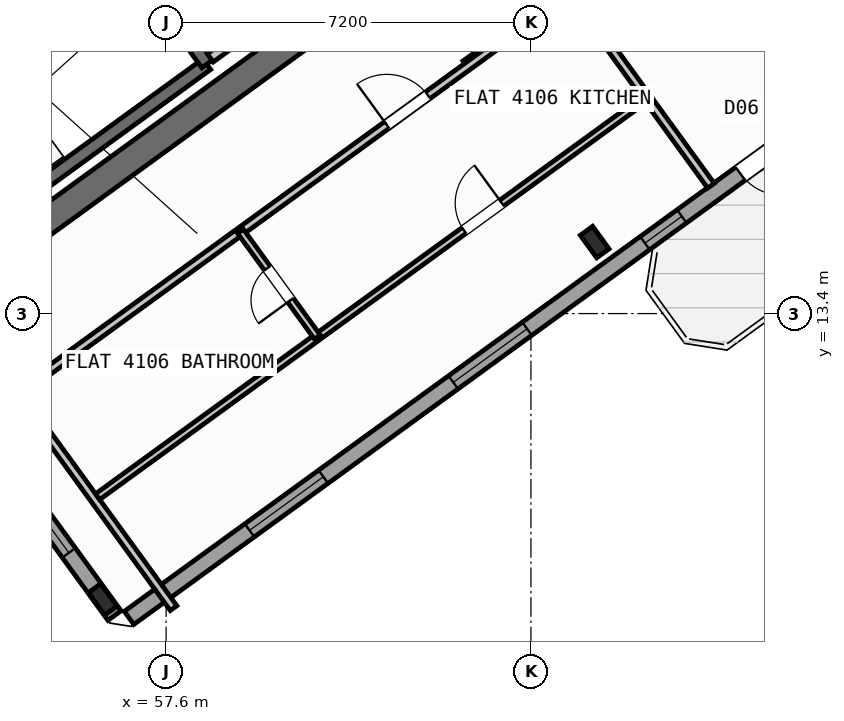
"""IFC4 building model, lengths in metres.
Left out: names, types, materials, properties, quantities, classifications, styles, units other than length and angle.
Written with IfcOpenShell. Run it as: python <this file> out.ifc"""

import sys

from ifc_helpers import new_model, si_unit, direction, frame, frame_2d, origin, origin_2d, place, context, subcontext, project, spatial, rectangle, i_section, extrude, source, transform, mapped, element, fill, save


model = new_model("IFC4")
c1 = context("Model", 3, precision=1e-05, world=origin(), true_north=direction((0.0, 1.0)))
c2 = subcontext(c1, "Body", "Model", "MODEL_VIEW")
j1 = project(units=[si_unit("LENGTHUNIT", "METRE"), si_unit("PLANEANGLEUNIT", "RADIAN")], contexts=[c1])
p1 = place(None, origin())
s1 = spatial("IfcSite", under=j1, at=p1, CompositionType="ELEMENT")
p2 = place(p1, origin())
s2 = spatial("IfcBuilding", under=s1, at=p2, CompositionType="ELEMENT")
p3 = place(p2, frame((0.0, 0.0, 162.3)))
s3 = spatial("IfcBuildingStorey", under=s2, at=p3, CompositionType="ELEMENT", Elevation=162.3)
p4 = place(p3, frame((52.359, 13.14, 0.0), z_axis=(0.0, 0.0, 1.0), x_axis=(0.809014896919, 0.587788139183, 0.0)))
e1 = element("IfcWall", 1, at=p4, inside=s3, PredefinedType="SHEAR", context=c2, shape_type="SweptSolid", body=[
    extrude(rectangle(XDim=12.34, YDim=0.55, at=frame_2d((6.17, 0.0))), origin(), (0.0, 0.0, 1.0), 3.35),
])
m1 = source(origin(), c2, "Body", "SweptSolid", [
    extrude(i_section(OverallWidth=0.3, OverallDepth=0.55, WebThickness=0.015, FlangeThickness=0.029, at=origin_2d()), origin(), (0.0, 0.0, 1.0), 3.6),
])
for number, where, z_axis, x_axis in (
    (2, (56.35, 7.758, 0.0), (0.0, 0.0, 1.0), (0.809, 0.588, 0.0)),
    (3, (66.058, 14.811, 0.0), (0.0, 0.0, 1.0), (0.809, 0.588, 0.0)),
):
    element("IfcColumn", number, at=place(p3, frame(where, z_axis=z_axis, x_axis=x_axis)), inside=s3, PredefinedType="COLUMN", context=c2, shape_type="MappedRepresentation", body=[
        mapped(m1, transform((0.0, 0.0, 0.0), scale=1.0)),
    ])
p5 = place(p3, frame((58.455, 35.484, 0.0), z_axis=(0.0, 0.0, 1.0), x_axis=(0.587783625747, -0.809018176127, 0.0)))
e4 = element("IfcWall", 4, at=p5, inside=s3, PredefinedType="STANDARD", context=c2, shape_type="SweptSolid", body=[
    extrude(rectangle(XDim=21.587, YDim=0.32, at=frame_2d((10.794, 0.0))), origin(), (0.0, 0.0, 1.0), 2.775),
])
p6 = place(p5, frame((1.475, 0.0, 0.8)))
e5 = element("IfcOpeningElement", 5, at=p6, cuts=e4, PredefinedType="OPENING", context=c2, shape_type="SweptSolid", body=[
    extrude(rectangle(XDim=2.1, YDim=1.55, at=frame_2d((1.05, 0.775))), frame((0.0, 0.17, 0.0), z_axis=(0.0, -1.0, 0.0), x_axis=(1.0, 0.0, 0.0)), (0.0, 0.0, 1.0), 0.34),
])
p7 = place(p5, frame((5.13, 0.0, 0.85)))
e6 = element("IfcOpeningElement", 6, at=p7, cuts=e4, PredefinedType="OPENING", context=c2, shape_type="SweptSolid", body=[
    extrude(rectangle(XDim=1.5, YDim=1.5, at=frame_2d((0.75, 0.75))), frame((0.0, 0.17, 0.0), z_axis=(0.0, -1.0, 0.0), x_axis=(1.0, 0.0, 0.0)), (0.0, 0.0, 1.0), 0.34),
])
p8 = place(p5, frame((8.929, 0.0, 0.85)))
e7 = element("IfcOpeningElement", 7, at=p8, cuts=e4, PredefinedType="OPENING", context=c2, shape_type="SweptSolid", body=[
    extrude(rectangle(XDim=1.5, YDim=1.5, at=frame_2d((0.75, 0.75))), frame((0.0, 0.17, 0.0), z_axis=(0.0, -1.0, 0.0), x_axis=(1.0, 0.0, 0.0)), (0.0, 0.0, 1.0), 0.34),
])
p9 = place(p5, frame((17.581, 0.0, 0.95)))
e8 = element("IfcOpeningElement", 8, at=p9, cuts=e4, PredefinedType="OPENING", context=c2, shape_type="SweptSolid", body=[
    extrude(rectangle(XDim=1.2, YDim=1.4, at=frame_2d((0.6, 0.7))), frame((0.0, 0.17, 0.0), z_axis=(0.0, -1.0, 0.0), x_axis=(1.0, 0.0, 0.0)), (0.0, 0.0, 1.0), 0.34),
])
p10 = place(p3, frame((71.098, 17.731, 0.0), z_axis=(0.0, 0.0, 1.0), x_axis=(-0.809021120468, -0.587779573171, 0.0)))
e9 = element("IfcWall", 9, at=p10, inside=s3, PredefinedType="STANDARD", context=c2, shape_type="SweptSolid", body=[
    extrude(rectangle(XDim=17.588, YDim=0.32, at=frame_2d((8.794, 0.0))), origin(), (0.0, 0.0, 1.0), 3.35),
])
p11 = place(p10, frame((1.624, 0.0, 0.0)))
e10 = element("IfcOpeningElement", 10, at=p11, cuts=e9, PredefinedType="OPENING", context=c2, shape_type="SweptSolid", body=[
    extrude(rectangle(XDim=1.05, YDim=2.15, at=frame_2d((0.525, 1.075))), frame((0.0, 0.17, 0.0), z_axis=(0.0, -1.0, 0.0), x_axis=(1.0, 0.0, 0.0)), (0.0, 0.0, 1.0), 0.34),
])
p12 = place(p10, frame((4.104, 0.0, 1.0)))
e11 = element("IfcOpeningElement", 11, at=p12, cuts=e9, PredefinedType="OPENING", context=c2, shape_type="SweptSolid", body=[
    extrude(rectangle(XDim=0.9, YDim=1.25, at=frame_2d((0.45, 0.625))), frame((0.0, 0.17, 0.0), z_axis=(0.0, -1.0, 0.0), x_axis=(1.0, 0.0, 0.0)), (0.0, 0.0, 1.0), 0.34),
])
p13 = place(p10, frame((7.879, 0.0, 0.85)))
e12 = element("IfcOpeningElement", 12, at=p13, cuts=e9, PredefinedType="OPENING", context=c2, shape_type="SweptSolid", body=[
    extrude(rectangle(XDim=1.8, YDim=1.5, at=frame_2d((0.9, 0.75))), frame((0.0, 0.17, 0.0), z_axis=(0.0, -1.0, 0.0), x_axis=(1.0, 0.0, 0.0)), (0.0, 0.0, 1.0), 0.34),
])
p14 = place(p10, frame((12.849, 0.0, 0.85)))
e13 = element("IfcOpeningElement", 13, at=p14, cuts=e9, PredefinedType="OPENING", context=c2, shape_type="SweptSolid", body=[
    extrude(rectangle(XDim=1.8, YDim=1.5, at=frame_2d((0.9, 0.75))), frame((0.0, 0.17, 0.0), z_axis=(0.0, -1.0, 0.0), x_axis=(1.0, 0.0, 0.0)), (0.0, 0.0, 1.0), 0.34),
])
p15 = place(p3, frame((56.581, 7.439, 0.0), z_axis=(0.0, 0.0, 1.0), x_axis=(-0.587771678454, 0.809026856172, 0.0)))
e14 = element("IfcWall", 14, at=p15, inside=s3, PredefinedType="STANDARD", context=c2, shape_type="SweptSolid", body=[
    extrude(rectangle(XDim=6.824, YDim=0.32, at=frame_2d((3.412, 0.0))), origin(), (0.0, 0.0, 1.0), 2.775),
])
p16 = place(p15, frame((1.531, 0.0, 0.8)))
e15 = element("IfcOpeningElement", 15, at=p16, cuts=e14, PredefinedType="OPENING", context=c2, shape_type="SweptSolid", body=[
    extrude(rectangle(XDim=2.1, YDim=1.55, at=frame_2d((1.05, 0.775))), frame((0.0, 0.17, 0.0), z_axis=(0.0, -1.0, 0.0), x_axis=(1.0, 0.0, 0.0)), (0.0, 0.0, 1.0), 0.34),
])
p17 = place(p3, frame((52.472, 14.013, 0.0), z_axis=(0.0, 0.0, 1.0), x_axis=(0.809028366311, 0.587769599847, 0.0)))
e16 = element("IfcWall", 16, at=p17, inside=s3, PredefinedType="SHEAR", context=c2, shape_type="SweptSolid", body=[
    extrude(rectangle(XDim=7.33, YDim=0.26, at=frame_2d((3.665, 0.0))), origin(), (0.0, 0.0, 1.0), 3.35),
])
p18 = place(p3, frame((50.615, 16.57, 0.0), z_axis=(0.0, 0.0, 1.0), x_axis=(0.809028366311, 0.587769599847, 0.0)))
e17 = element("IfcWall", 17, at=p18, inside=s3, PredefinedType="SHEAR", context=c2, shape_type="SweptSolid", body=[
    extrude(rectangle(XDim=7.33, YDim=0.26, at=frame_2d((3.665, 0.0))), origin(), (0.0, 0.0, 1.0), 3.35),
])
p19 = place(p18, frame((0.22, 0.0, 0.0)))
e18 = element("IfcOpeningElement", 18, at=p19, cuts=e17, PredefinedType="OPENING", context=c2, shape_type="SweptSolid", body=[
    extrude(rectangle(XDim=1.1, YDim=2.1, at=frame_2d((0.55, 1.05))), frame((0.0, 0.14, 0.0), z_axis=(0.0, -1.0, 0.0), x_axis=(1.0, 0.0, 0.0)), (0.0, 0.0, 1.0), 0.28),
])
p20 = place(p3, frame((58.41, 18.327, 0.0), z_axis=(0.0, 0.0, 1.0), x_axis=(-0.58776738483, 0.809029975545, 0.0)))
e19 = element("IfcWall", 19, at=p20, inside=s3, PredefinedType="SHEAR", context=c2, shape_type="SweptSolid", body=[
    extrude(rectangle(XDim=3.16, YDim=0.26, at=frame_2d((1.58, 0.0))), origin(), (0.0, 0.0, 1.0), 3.35),
])
p21 = place(p3, frame((58.472, 18.447, 0.0), z_axis=(0.0, 0.0, 1.0), x_axis=(0.809018631237, 0.587782999339, 0.0)))
e20 = element("IfcWall", 20, at=p21, inside=s3, PredefinedType="STANDARD", context=c2, shape_type="SweptSolid", body=[
    extrude(rectangle(XDim=3.698, YDim=0.2, at=frame_2d((1.849, 0.0))), origin(), (0.0, 0.0, 1.0), 3.34),
])
p22 = place(p3, frame((63.507, 18.322, 0.0), z_axis=(0.0, 0.0, 1.0), x_axis=(0.809034604122, 0.587761013791, 0.0)))
e21 = element("IfcWall", 21, at=p22, inside=s3, PredefinedType="PARTITIONING", context=c2, shape_type="SweptSolid", body=[
    extrude(rectangle(XDim=2.51, YDim=0.16, at=frame_2d((1.255, 0.0))), origin(), (0.0, 0.0, 1.0), 3.34),
])
p23 = place(p3, frame((68.353, 15.922, 0.0), z_axis=(0.0, 0.0, 1.0), x_axis=(-0.58776839458, 0.809029241952, 0.0)))
e22 = element("IfcWall", 22, at=p23, inside=s3, PredefinedType="PARTITIONING", context=c2, shape_type="SweptSolid", body=[
    extrude(rectangle(XDim=8.1, YDim=0.16, at=frame_2d((4.05, 0.0))), origin(), (0.0, 0.0, 1.0), 3.34),
])
p24 = place(p3, frame((53.705, 11.126, 0.0), z_axis=(0.0, 0.0, 1.0), x_axis=(0.809014504436, 0.587788679384, 0.0)))
e23 = element("IfcWall", 23, at=p24, inside=s3, PredefinedType="PARTITIONING", context=c2, shape_type="SweptSolid", body=[
    extrude(rectangle(XDim=14.67, YDim=0.16, at=frame_2d((7.335, 0.0))), origin(), (0.0, 0.0, 1.0), 3.34),
])
p25 = place(p24, frame((10.2, 0.0, 0.0)))
e24 = element("IfcOpeningElement", 24, at=p25, cuts=e23, PredefinedType="OPENING", context=c2, shape_type="SweptSolid", body=[
    extrude(rectangle(XDim=1.0, YDim=2.1, at=frame_2d((0.5, 1.05))), frame((0.0, 0.09, 0.0), z_axis=(0.0, -1.0, 0.0), x_axis=(1.0, 0.0, 0.0)), (0.0, 0.0, 1.0), 0.18),
])
p26 = place(p3, frame((57.747, 7.586, 0.0), z_axis=(0.0, 0.0, 1.0), x_axis=(-0.587784893399, 0.809017255126, 0.0)))
e25 = element("IfcWall", 25, at=p26, inside=s3, PredefinedType="PARTITIONING", context=c2, shape_type="SweptSolid", body=[
    extrude(rectangle(XDim=5.48, YDim=0.16, at=frame_2d((2.74, 0.0))), origin(), (0.0, 0.0, 1.0), 3.34),
])
p27 = place(p3, frame((56.249, 9.785, 0.0), z_axis=(0.0, 0.0, 1.0), x_axis=(0.809011747655, 0.587792473715, 0.0)))
e26 = element("IfcWall", 26, at=p27, inside=s3, PredefinedType="PLUMBINGWALL", context=c2, shape_type="SweptSolid", body=[
    extrude(rectangle(XDim=13.4, YDim=0.14, at=frame_2d((6.7, 0.0))), origin(), (0.0, 0.0, 1.0), 3.34),
])
p28 = place(p27, frame((8.94, 0.0, 0.0)))
e27 = element("IfcOpeningElement", 27, at=p28, cuts=e26, PredefinedType="OPENING", context=c2, shape_type="SweptSolid", body=[
    extrude(rectangle(XDim=0.92, YDim=2.08, at=frame_2d((0.46, 1.04))), frame((0.0, 0.08, 0.0), z_axis=(0.0, -1.0, 0.0), x_axis=(1.0, 0.0, 0.0)), (0.0, 0.0, 1.0), 0.16),
])
p29 = place(p3, frame((60.585, 12.936, 0.0), z_axis=(0.0, 0.0, 1.0), x_axis=(-0.587772116736, 0.809026537752, 0.0)))
e28 = element("IfcWall", 28, at=p29, inside=s3, PredefinedType="PLUMBINGWALL", context=c2, shape_type="SweptSolid", body=[
    extrude(rectangle(XDim=2.58, YDim=0.14, at=frame_2d((1.29, 0.0))), origin(), (0.0, 0.0, 1.0), 3.34),
])
p30 = place(p29, frame((0.9, 0.0, 0.0)))
e29 = element("IfcOpeningElement", 29, at=p30, cuts=e28, PredefinedType="OPENING", context=c2, shape_type="SweptSolid", body=[
    extrude(rectangle(XDim=0.78, YDim=2.05, at=frame_2d((0.39, 1.025))), frame((0.0, 0.08, 0.0), z_axis=(0.0, -1.0, 0.0), x_axis=(1.0, 0.0, 0.0)), (0.0, 0.0, 1.0), 0.16),
])
m2 = source(origin(), c2, "Body", "SweptSolid", [
    extrude(rectangle(XDim=1.05, YDim=2.15, at=frame_2d((0.525, 1.075))), frame((0.0, 0.025, 0.0), z_axis=(0.0, -1.0, 0.0), x_axis=(1.0, 0.0, 0.0)), (0.0, 0.0, 1.0), 0.05),
])
p31 = place(p11, origin())
e30 = element("IfcDoor", 30, at=p31, inside=s3, OperationType="SINGLE_SWING_LEFT", PredefinedType="DOOR", context=c2, shape_type="MappedRepresentation", body=[
    mapped(m2, transform((0.0, 0.0, 0.0), scale=1.0)),
])
fill(e10, e30)
m3 = source(origin(), c2, "Body", "SweptSolid", [
    extrude(rectangle(XDim=0.9, YDim=1.25, at=frame_2d((0.45, 0.625))), frame((0.0, 0.03, 0.0), z_axis=(0.0, -1.0, 0.0), x_axis=(1.0, 0.0, 0.0)), (0.0, 0.0, 1.0), 0.06),
])
p32 = place(p12, origin())
e31 = element("IfcWindow", 31, at=p32, inside=s3, PartitioningType="SINGLE_PANEL", PredefinedType="WINDOW", context=c2, shape_type="MappedRepresentation", body=[
    mapped(m3, transform((0.0, 0.0, 0.0), scale=1.0)),
])
fill(e11, e31)
m4 = source(origin(), c2, "Body", "SweptSolid", [
    extrude(rectangle(XDim=1.8, YDim=1.5, at=frame_2d((0.9, 0.75))), frame((0.0, 0.03, 0.0), z_axis=(0.0, -1.0, 0.0), x_axis=(1.0, 0.0, 0.0)), (0.0, 0.0, 1.0), 0.06),
])
p33 = place(p13, origin())
e32 = element("IfcWindow", 32, at=p33, inside=s3, PartitioningType="SINGLE_PANEL", PredefinedType="WINDOW", context=c2, shape_type="MappedRepresentation", body=[
    mapped(m4, transform((0.0, 0.0, 0.0), scale=1.0)),
])
fill(e12, e32)
p34 = place(p14, origin())
e33 = element("IfcWindow", 33, at=p34, inside=s3, PartitioningType="SINGLE_PANEL", PredefinedType="WINDOW", context=c2, shape_type="MappedRepresentation", body=[
    mapped(m4, transform((0.0, 0.0, 0.0), scale=1.0)),
])
fill(e13, e33)
m5 = source(origin(), c2, "Body", "SweptSolid", [
    extrude(rectangle(XDim=2.1, YDim=1.55, at=frame_2d((1.05, 0.775))), frame((0.0, 0.03, 0.0), z_axis=(0.0, -1.0, 0.0), x_axis=(1.0, 0.0, 0.0)), (0.0, 0.0, 1.0), 0.06),
])
p35 = place(p16, origin())
e34 = element("IfcWindow", 34, at=p35, inside=s3, PartitioningType="SINGLE_PANEL", PredefinedType="WINDOW", context=c2, shape_type="MappedRepresentation", body=[
    mapped(m5, transform((0.0, 0.0, 0.0), scale=1.0)),
])
fill(e15, e34)
m6 = source(origin(), c2, "Body", "SweptSolid", [
    extrude(rectangle(XDim=1.0, YDim=2.1, at=frame_2d((0.5, 1.05))), frame((0.0, 0.025, 0.0), z_axis=(0.0, -1.0, 0.0), x_axis=(1.0, 0.0, 0.0)), (0.0, 0.0, 1.0), 0.05),
])
p36 = place(p25, origin())
e35 = element("IfcDoor", 35, at=p36, inside=s3, OperationType="SINGLE_SWING_LEFT", PredefinedType="DOOR", context=c2, shape_type="MappedRepresentation", body=[
    mapped(m6, transform((0.0, 0.0, 0.0), scale=1.0)),
])
fill(e24, e35)
m7 = source(origin(), c2, "Body", "SweptSolid", [
    extrude(rectangle(XDim=0.92, YDim=2.08, at=frame_2d((0.46, 1.04))), frame((0.0, 0.025, 0.0), z_axis=(0.0, -1.0, 0.0), x_axis=(1.0, 0.0, 0.0)), (0.0, 0.0, 1.0), 0.05),
])
p37 = place(p28, origin())
e36 = element("IfcDoor", 36, at=p37, inside=s3, OperationType="SINGLE_SWING_RIGHT", PredefinedType="DOOR", context=c2, shape_type="MappedRepresentation", body=[
    mapped(m7, transform((0.0, 0.0, 0.0), scale=1.0)),
])
fill(e27, e36)
m8 = source(origin(), c2, "Body", "SweptSolid", [
    extrude(rectangle(XDim=0.78, YDim=2.05, at=frame_2d((0.39, 1.025))), frame((0.0, 0.025, 0.0), z_axis=(0.0, -1.0, 0.0), x_axis=(1.0, 0.0, 0.0)), (0.0, 0.0, 1.0), 0.05),
])
p38 = place(p30, origin())
e37 = element("IfcDoor", 37, at=p38, inside=s3, OperationType="SINGLE_SWING_LEFT", PredefinedType="DOOR", context=c2, shape_type="MappedRepresentation", body=[
    mapped(m8, transform((0.0, 0.0, 0.0), scale=1.0)),
])
fill(e29, e37)
save(model, sys.argv[1])
